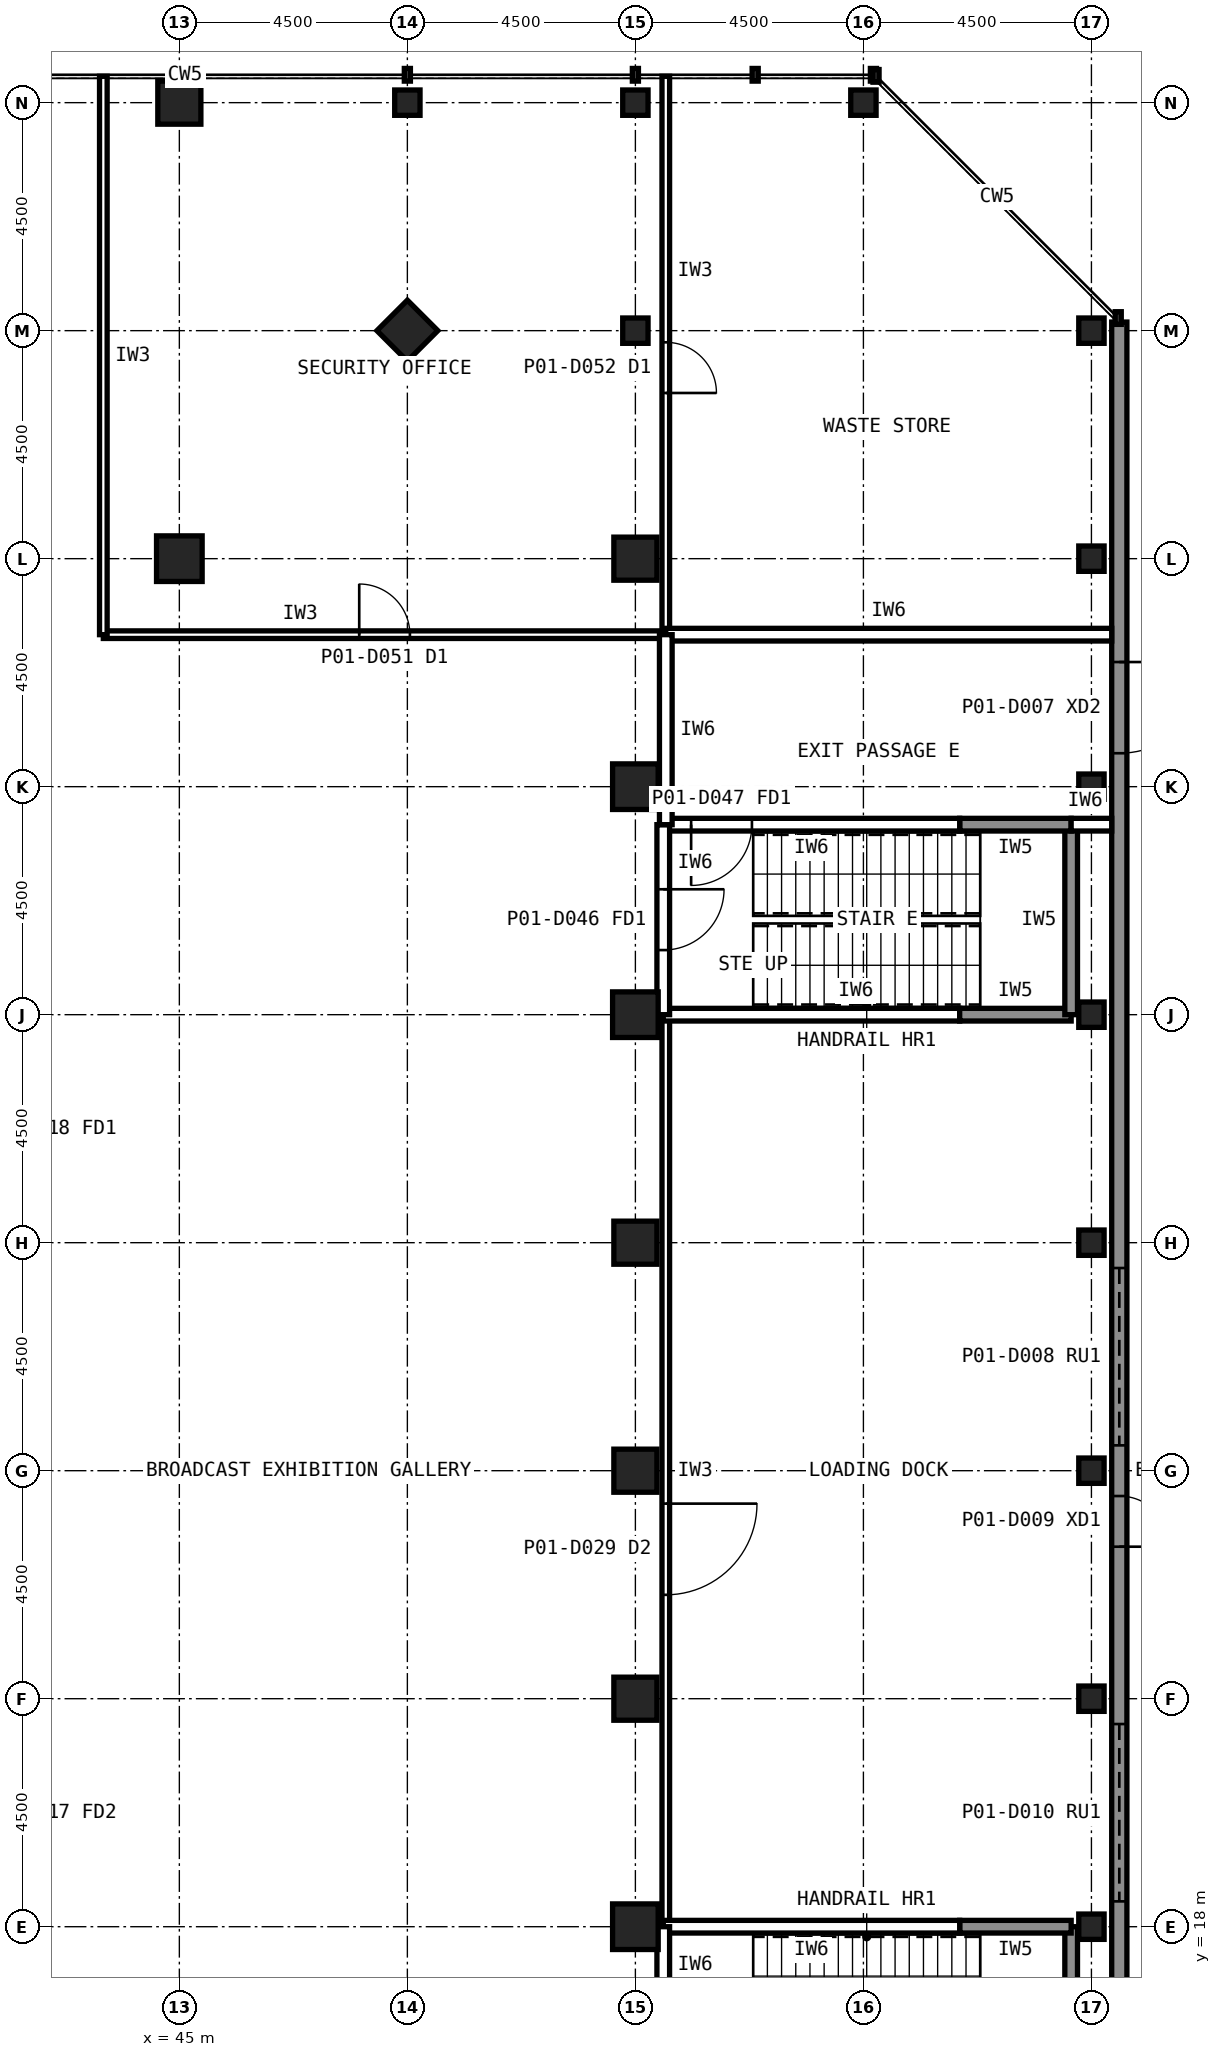
"""IFC4 building model, lengths in metres.
Left out: names, types, materials, properties, quantities, classifications, styles, units other than length and angle.
Written with IfcOpenShell. Run it as: python <this file> out.ifc"""

import sys

from ifc_helpers import new_model, si_unit, direction, frame, frame_2d, origin, origin_2d, place, context, subcontext, project, spatial, rectangle, hollow_rectangle, extrude, element, fill, save


model = new_model("IFC4")
c1 = context("Model", 3, precision=1e-05, world=origin(), true_north=direction((0.0, 1.0)))
c2 = subcontext(c1, "Body", "Model", "MODEL_VIEW")
j1 = project(units=[si_unit("LENGTHUNIT", "METRE"), si_unit("PLANEANGLEUNIT", "RADIAN")], contexts=[c1])
p1 = place(None, origin())
s1 = spatial("IfcSite", under=j1, at=p1, CompositionType="ELEMENT")
p2 = place(p1, origin())
s2 = spatial("IfcBuilding", under=s1, at=p2, CompositionType="ELEMENT")
p3 = place(p2, origin())
s3 = spatial("IfcBuildingStorey", under=s2, at=p3, CompositionType="ELEMENT", Elevation=0.0)
p4 = place(p3, frame((54.0, 18.0, -0.25), z_axis=(0.0, 0.0, 1.0), x_axis=(1.0, 0.0, 0.0)))
e1 = element("IfcColumn", 1, at=p4, inside=s3, PredefinedType="COLUMN", context=c2, shape_type="SweptSolid", body=[
    extrude(hollow_rectangle(XDim=0.9, YDim=0.9, WallThickness=0.063, at=origin_2d()), origin(), (0.0, 0.0, 1.0), 6.25),
])
for number, where, z_axis, x_axis in (
    (2, (54.0, 22.5, -0.25), (0.0, 0.0, 1.0), (1.0, 0.0, 0.0)),
    (3, (54.0, 27.0, -0.25), (0.0, 0.0, 1.0), (1.0, 0.0, 0.0)),
    (4, (54.0, 31.5, -0.25), (0.0, 0.0, 1.0), (1.0, 0.0, 0.0)),
):
    element("IfcColumn", number, at=place(p3, frame(where, z_axis=z_axis, x_axis=x_axis)), inside=s3, PredefinedType="COLUMN", context=c2, shape_type="SweptSolid", body=[
        extrude(hollow_rectangle(XDim=0.85, YDim=0.85, WallThickness=0.05, at=origin_2d()), origin(), (0.0, 0.0, 1.0), 6.25),
    ])
for number, where, z_axis, x_axis in (
    (5, (54.0, 36.0, -0.25), (0.0, 0.0, 1.0), (1.0, 0.0, 0.0)),
    (6, (54.0, 40.5, -0.25), (0.0, 0.0, 1.0), (1.0, 0.0, 0.0)),
):
    element("IfcColumn", number, at=place(p3, frame(where, z_axis=z_axis, x_axis=x_axis)), inside=s3, PredefinedType="COLUMN", context=c2, shape_type="SweptSolid", body=[
        extrude(hollow_rectangle(XDim=0.9, YDim=0.9, WallThickness=0.063, at=origin_2d()), origin(), (0.0, 0.0, 1.0), 6.25),
    ])
for number, where, z_axis, x_axis in (
    (7, (54.0, 45.0, -0.25), (0.0, 0.0, 1.0), (1.0, 0.0, 0.0)),
    (8, (45.0, 54.0, -0.25), (0.0, 0.0, 1.0), (1.0, 0.0, 0.0)),
    (9, (49.5, 49.5, -0.25), (0.0, 0.0, 1.0), (0.707, 0.707, 0.0)),
):
    element("IfcColumn", number, at=place(p3, frame(where, z_axis=z_axis, x_axis=x_axis)), inside=s3, PredefinedType="COLUMN", context=c2, shape_type="SweptSolid", body=[
        extrude(hollow_rectangle(XDim=0.85, YDim=0.85, WallThickness=0.05, at=origin_2d()), origin(), (0.0, 0.0, 1.0), 6.25),
    ])
p5 = place(p3, frame((45.0, 45.0, -0.25), z_axis=(0.0, 0.0, 1.0), x_axis=(1.0, 0.0, 0.0)))
e10 = element("IfcColumn", 10, at=p5, inside=s3, PredefinedType="COLUMN", context=c2, shape_type="SweptSolid", body=[
    extrude(hollow_rectangle(XDim=0.9, YDim=0.9, WallThickness=0.063, at=origin_2d()), origin(), (0.0, 0.0, 1.0), 6.25),
])
for number, where, z_axis, x_axis in (
    (11, (63.0, 18.0, -0.25), (0.0, 0.0, 1.0), (1.0, 0.0, 0.0)),
    (12, (63.0, 22.5, -0.25), (0.0, 0.0, 1.0), (1.0, 0.0, 0.0)),
    (13, (63.0, 27.0, -0.25), (0.0, 0.0, 1.0), (1.0, 0.0, 0.0)),
    (14, (63.0, 31.5, -0.25), (0.0, 0.0, 1.0), (1.0, 0.0, 0.0)),
    (15, (63.0, 36.0, -0.25), (0.0, 0.0, 1.0), (1.0, 0.0, 0.0)),
    (16, (63.0, 40.5, -0.25), (0.0, 0.0, 1.0), (1.0, 0.0, 0.0)),
    (17, (63.0, 45.0, -0.25), (0.0, 0.0, 1.0), (1.0, 0.0, 0.0)),
    (18, (63.0, 49.5, -0.25), (0.0, 0.0, 1.0), (1.0, 0.0, 0.0)),
    (19, (58.5, 54.0, -0.25), (0.0, 0.0, 1.0), (1.0, 0.0, 0.0)),
    (20, (54.0, 54.0, -0.25), (0.0, 0.0, 1.0), (1.0, 0.0, 0.0)),
    (21, (49.5, 54.0, -0.25), (0.0, 0.0, 1.0), (1.0, 0.0, 0.0)),
    (22, (54.0, 49.5, -0.25), (0.0, 0.0, 1.0), (1.0, 0.0, 0.0)),
):
    element("IfcColumn", number, at=place(p3, frame(where, z_axis=z_axis, x_axis=x_axis)), inside=s3, PredefinedType="COLUMN", context=c2, shape_type="SweptSolid", body=[
        extrude(hollow_rectangle(XDim=0.5, YDim=0.5, WallThickness=0.022, at=origin_2d()), origin(), (0.0, 0.0, 1.0), 6.25),
    ])
p6 = place(p3, frame((63.55, 49.67, 0.0), z_axis=(0.0, 0.0, 1.0), x_axis=(0.0, -1.0, 0.0)))
e23 = element("IfcWall", 23, at=p6, inside=s3, PredefinedType="SOLIDWALL", context=c2, shape_type="SweptSolid", body=[
    extrude(rectangle(XDim=45.34, YDim=0.3, at=frame_2d((22.67, 0.0))), origin(), (0.0, 0.0, 1.0), 6.0),
])
p7 = place(p6, frame((27.67, 0.0, 0.0)))
e24 = element("IfcOpeningElement", 24, at=p7, cuts=e23, PredefinedType="OPENING", context=c2, shape_type="SweptSolid", body=[
    extrude(rectangle(XDim=3.5, YDim=4.5, at=frame_2d((1.75, 2.25))), frame((0.0, 0.16, 0.0), z_axis=(0.0, -1.0, 0.0), x_axis=(1.0, 0.0, 0.0)), (0.0, 0.0, 1.0), 0.32),
])
p8 = place(p6, frame((18.67, 0.0, 0.0)))
e25 = element("IfcOpeningElement", 25, at=p8, cuts=e23, PredefinedType="OPENING", context=c2, shape_type="SweptSolid", body=[
    extrude(rectangle(XDim=3.5, YDim=4.5, at=frame_2d((1.75, 2.25))), frame((0.0, 0.16, 0.0), z_axis=(0.0, -1.0, 0.0), x_axis=(1.0, 0.0, 0.0)), (0.0, 0.0, 1.0), 0.32),
])
p9 = place(p6, frame((23.17, 0.0, 0.0)))
e26 = element("IfcOpeningElement", 26, at=p9, cuts=e23, PredefinedType="OPENING", context=c2, shape_type="SweptSolid", body=[
    extrude(rectangle(XDim=1.0, YDim=2.1, at=frame_2d((0.5, 1.05))), frame((0.0, 0.16, 0.0), z_axis=(0.0, -1.0, 0.0), x_axis=(1.0, 0.0, 0.0)), (0.0, 0.0, 1.0), 0.32),
])
p10 = place(p6, frame((36.83, 0.0, 0.0)))
e27 = element("IfcOpeningElement", 27, at=p10, cuts=e23, PredefinedType="OPENING", context=c2, shape_type="SweptSolid", body=[
    extrude(rectangle(XDim=1.8, YDim=2.1, at=frame_2d((0.9, 1.05))), frame((0.0, 0.16, 0.0), z_axis=(0.0, -1.0, 0.0), x_axis=(1.0, 0.0, 0.0)), (0.0, 0.0, 1.0), 0.32),
])
p11 = place(p6, frame((6.71, 0.0, 0.0)))
e28 = element("IfcOpeningElement", 28, at=p11, cuts=e23, PredefinedType="OPENING", context=c2, shape_type="SweptSolid", body=[
    extrude(rectangle(XDim=1.8, YDim=2.1, at=frame_2d((0.9, 1.05))), frame((0.0, 0.16, 0.0), z_axis=(0.0, -1.0, 0.0), x_axis=(1.0, 0.0, 0.0)), (0.0, 0.0, 1.0), 0.32),
])
p12 = place(p3, frame((54.6, 35.95, 0.0), z_axis=(0.0, 0.0, 1.0), x_axis=(0.0, -1.0, 0.0)))
e29 = element("IfcWall", 29, at=p12, inside=s3, PredefinedType="PARTITIONING", context=c2, shape_type="SweptSolid", body=[
    extrude(rectangle(XDim=17.9, YDim=0.15, at=frame_2d((8.95, 0.0))), origin(), (0.0, 0.0, 1.0), 5.8),
])
p13 = place(p12, frame((9.6, 0.0, 0.0)))
e30 = element("IfcOpeningElement", 30, at=p13, cuts=e29, PredefinedType="OPENING", context=c2, shape_type="SweptSolid", body=[
    extrude(rectangle(XDim=1.8, YDim=2.4, at=frame_2d((0.9, 1.2))), frame((0.0, 0.085, 0.0), z_axis=(0.0, -1.0, 0.0), x_axis=(1.0, 0.0, 0.0)), (0.0, 0.0, 1.0), 0.17),
])
p14 = place(p3, frame((54.6, 54.52, 0.0), z_axis=(0.0, 0.0, 1.0), x_axis=(0.0, -1.0, 0.0)))
e31 = element("IfcWall", 31, at=p14, inside=s3, PredefinedType="PARTITIONING", context=c2, shape_type="SweptSolid", body=[
    extrude(rectangle(XDim=10.97, YDim=0.15, at=frame_2d((5.485, 0.0))), origin(), (0.0, 0.0, 1.0), 5.8),
])
p15 = place(p14, frame((5.25, 0.0, 0.0)))
e32 = element("IfcOpeningElement", 32, at=p15, cuts=e31, PredefinedType="OPENING", context=c2, shape_type="SweptSolid", body=[
    extrude(rectangle(XDim=1.0, YDim=2.1, at=frame_2d((0.5, 1.05))), frame((0.0, 0.085, 0.0), z_axis=(0.0, -1.0, 0.0), x_axis=(1.0, 0.0, 0.0)), (0.0, 0.0, 1.0), 0.17),
])
p16 = place(p3, frame((43.5, 43.5, 0.0), z_axis=(0.0, 0.0, 1.0), x_axis=(1.0, 0.0, 0.0)))
e33 = element("IfcWall", 33, at=p16, inside=s3, PredefinedType="PARTITIONING", context=c2, shape_type="SweptSolid", body=[
    extrude(rectangle(XDim=11.1, YDim=0.15, at=frame_2d((5.55, 0.0))), origin(), (0.0, 0.0, 1.0), 5.8),
])
p17 = place(p16, frame((5.05, 0.0, 0.0)))
e34 = element("IfcOpeningElement", 34, at=p17, cuts=e33, PredefinedType="OPENING", context=c2, shape_type="SweptSolid", body=[
    extrude(rectangle(XDim=1.0, YDim=2.1, at=frame_2d((0.5, 1.05))), frame((0.0, 0.085, 0.0), z_axis=(0.0, -1.0, 0.0), x_axis=(1.0, 0.0, 0.0)), (0.0, 0.0, 1.0), 0.17),
])
p18 = place(p3, frame((43.5, 54.52, 0.0), z_axis=(0.0, 0.0, 1.0), x_axis=(0.0, -1.0, 0.0)))
e35 = element("IfcWall", 35, at=p18, inside=s3, PredefinedType="PARTITIONING", context=c2, shape_type="SweptSolid", body=[
    extrude(rectangle(XDim=11.02, YDim=0.15, at=frame_2d((5.51, 0.0))), origin(), (0.0, 0.0, 1.0), 5.8),
])
p19 = place(p3, frame((62.6, 14.25, -0.25), z_axis=(0.0, 0.0, 1.0), x_axis=(0.0, 1.0, 0.0)))
e36 = element("IfcWall", 36, at=p19, inside=s3, PredefinedType="SOLIDWALL", context=c2, shape_type="SweptSolid", body=[
    extrude(rectangle(XDim=3.75, YDim=0.25, at=frame_2d((1.875, 0.0))), origin(), (0.0, 0.0, 1.0), 6.25),
])
p20 = place(p3, frame((62.6, 18.0, -0.25), z_axis=(0.0, 0.0, 1.0), x_axis=(-1.0, 0.0, 0.0)))
e37 = element("IfcWall", 37, at=p20, inside=s3, PredefinedType="SOLIDWALL", context=c2, shape_type="SweptSolid", body=[
    extrude(rectangle(XDim=2.2, YDim=0.25, at=frame_2d((1.1, 0.0))), origin(), (0.0, 0.0, 1.0), 5.439),
])
p21 = place(p3, frame((60.4, 18.0, -0.25), z_axis=(0.0, 0.0, 1.0), x_axis=(-1.0, 0.0, 0.0)))
e38 = element("IfcWall", 38, at=p21, inside=s3, PredefinedType="PARTITIONING", context=c2, shape_type="SweptSolid", body=[
    extrude(rectangle(XDim=5.85, YDim=0.25, at=frame_2d((2.925, 0.0))), origin(), (0.0, 0.0, 1.0), 5.439),
])
p22 = place(p3, frame((54.55, 18.0, -0.25), z_axis=(0.0, 0.0, 1.0), x_axis=(0.0, -1.0, 0.0)))
e39 = element("IfcWall", 39, at=p22, inside=s3, PredefinedType="PARTITIONING", context=c2, shape_type="SweptSolid", body=[
    extrude(rectangle(XDim=3.75, YDim=0.25, at=frame_2d((1.875, 0.0))), origin(), (0.0, 0.0, 1.0), 6.05),
])
p23 = place(p22, frame((1.275, 0.0, 0.25)))
e40 = element("IfcOpeningElement", 40, at=p23, cuts=e39, PredefinedType="OPENING", context=c2, shape_type="SweptSolid", body=[
    extrude(rectangle(XDim=1.2, YDim=2.1, at=frame_2d((0.6, 1.05))), frame((0.0, 0.135, 0.0), z_axis=(0.0, -1.0, 0.0), x_axis=(1.0, 0.0, 0.0)), (0.0, 0.0, 1.0), 0.27),
])
p24 = place(p3, frame((54.55, 36.0, -0.25), z_axis=(0.0, 0.0, 1.0), x_axis=(1.0, 0.0, 0.0)))
e41 = element("IfcWall", 41, at=p24, inside=s3, PredefinedType="PARTITIONING", context=c2, shape_type="SweptSolid", body=[
    extrude(rectangle(XDim=5.85, YDim=0.25, at=frame_2d((2.925, 0.0))), origin(), (0.0, 0.0, 1.0), 5.439),
])
p25 = place(p3, frame((60.4, 36.0, -0.25), z_axis=(0.0, 0.0, 1.0), x_axis=(1.0, 0.0, 0.0)))
e42 = element("IfcWall", 42, at=p25, inside=s3, PredefinedType="SOLIDWALL", context=c2, shape_type="SweptSolid", body=[
    extrude(rectangle(XDim=2.2, YDim=0.25, at=frame_2d((1.1, 0.0))), origin(), (0.0, 0.0, 1.0), 5.439),
])
p26 = place(p3, frame((62.6, 36.0, -0.25), z_axis=(0.0, 0.0, 1.0), x_axis=(0.0, 1.0, 0.0)))
e43 = element("IfcWall", 43, at=p26, inside=s3, PredefinedType="SOLIDWALL", context=c2, shape_type="SweptSolid", body=[
    extrude(rectangle(XDim=3.75, YDim=0.25, at=frame_2d((1.875, 0.0))), origin(), (0.0, 0.0, 1.0), 6.25),
])
p27 = place(p3, frame((62.6, 39.75, -0.25), z_axis=(0.0, 0.0, 1.0), x_axis=(-1.0, 0.0, 0.0)))
e44 = element("IfcWall", 44, at=p27, inside=s3, PredefinedType="SOLIDWALL", context=c2, shape_type="SweptSolid", body=[
    extrude(rectangle(XDim=2.2, YDim=0.25, at=frame_2d((1.1, 0.0))), origin(), (0.0, 0.0, 1.0), 6.25),
])
p28 = place(p3, frame((60.4, 39.75, -0.25), z_axis=(0.0, 0.0, 1.0), x_axis=(-1.0, 0.0, 0.0)))
e45 = element("IfcWall", 45, at=p28, inside=s3, PredefinedType="PARTITIONING", context=c2, shape_type="SweptSolid", body=[
    extrude(rectangle(XDim=5.85, YDim=0.25, at=frame_2d((2.925, 0.0))), origin(), (0.0, 0.0, 1.0), 6.05),
])
p29 = place(p28, frame((4.1, 0.0, 0.25)))
e46 = element("IfcOpeningElement", 46, at=p29, cuts=e45, PredefinedType="OPENING", context=c2, shape_type="SweptSolid", body=[
    extrude(rectangle(XDim=1.2, YDim=2.1, at=frame_2d((0.6, 1.05))), frame((0.0, 0.135, 0.0), z_axis=(0.0, -1.0, 0.0), x_axis=(1.0, 0.0, 0.0)), (0.0, 0.0, 1.0), 0.27),
])
p30 = place(p3, frame((54.55, 39.75, -0.25), z_axis=(0.0, 0.0, 1.0), x_axis=(0.0, -1.0, 0.0)))
e47 = element("IfcWall", 47, at=p30, inside=s3, PredefinedType="PARTITIONING", context=c2, shape_type="SweptSolid", body=[
    extrude(rectangle(XDim=3.75, YDim=0.25, at=frame_2d((1.875, 0.0))), origin(), (0.0, 0.0, 1.0), 6.05),
])
p31 = place(p30, frame((1.275, 0.0, 0.25)))
e48 = element("IfcOpeningElement", 48, at=p31, cuts=e47, PredefinedType="OPENING", context=c2, shape_type="SweptSolid", body=[
    extrude(rectangle(XDim=1.2, YDim=2.1, at=frame_2d((0.6, 1.05))), frame((0.0, 0.135, 0.0), z_axis=(0.0, -1.0, 0.0), x_axis=(1.0, 0.0, 0.0)), (0.0, 0.0, 1.0), 0.27),
])
p32 = place(p3, frame((54.6, 43.5, 0.0), z_axis=(0.0, 0.0, 1.0), x_axis=(1.0, 0.0, 0.0)))
e49 = element("IfcWall", 49, at=p32, inside=s3, PredefinedType="PARTITIONING", context=c2, shape_type="SweptSolid", body=[
    extrude(rectangle(XDim=8.8, YDim=0.25, at=frame_2d((4.4, 0.0))), origin(), (0.0, 0.0, 1.0), 5.8),
])
p33 = place(p3, frame((54.6, 43.5, 0.0), z_axis=(0.0, 0.0, 1.0), x_axis=(0.0, -1.0, 0.0)))
e50 = element("IfcWall", 50, at=p33, inside=s3, PredefinedType="PARTITIONING", context=c2, shape_type="SweptSolid", body=[
    extrude(rectangle(XDim=3.75, YDim=0.25, at=frame_2d((1.875, 0.0))), origin(), (0.0, 0.0, 1.0), 5.8),
])
p34 = place(p3, frame((62.6, 39.75, 0.0), z_axis=(0.0, 0.0, 1.0), x_axis=(1.0, 0.0, 0.0)))
e51 = element("IfcWall", 51, at=p34, inside=s3, PredefinedType="PARTITIONING", context=c2, shape_type="SweptSolid", body=[
    extrude(rectangle(XDim=0.8, YDim=0.25, at=frame_2d((0.4, 0.0))), origin(), (0.0, 0.0, 1.0), 5.8),
])
p35 = place(p7, origin())
e52 = element("IfcDoor", 52, at=p35, inside=s3, OperationType="SINGLE_SWING_LEFT", PredefinedType="DOOR", context=c2, shape_type="SweptSolid", body=[
    extrude(rectangle(XDim=3.5, YDim=4.5, at=frame_2d((1.75, 2.25))), frame((0.0, 0.025, 0.0), z_axis=(0.0, -1.0, 0.0), x_axis=(1.0, 0.0, 0.0)), (0.0, 0.0, 1.0), 0.05),
])
fill(e24, e52)
p36 = place(p8, origin())
e53 = element("IfcDoor", 53, at=p36, inside=s3, OperationType="SINGLE_SWING_LEFT", PredefinedType="DOOR", context=c2, shape_type="SweptSolid", body=[
    extrude(rectangle(XDim=3.5, YDim=4.5, at=frame_2d((1.75, 2.25))), frame((0.0, 0.025, 0.0), z_axis=(0.0, -1.0, 0.0), x_axis=(1.0, 0.0, 0.0)), (0.0, 0.0, 1.0), 0.05),
])
fill(e25, e53)
p37 = place(p9, origin())
e54 = element("IfcDoor", 54, at=p37, inside=s3, OperationType="SINGLE_SWING_RIGHT", PredefinedType="DOOR", context=c2, shape_type="SweptSolid", body=[
    extrude(rectangle(XDim=1.0, YDim=2.1, at=frame_2d((0.5, 1.05))), frame((0.0, 0.025, 0.0), z_axis=(0.0, -1.0, 0.0), x_axis=(1.0, 0.0, 0.0)), (0.0, 0.0, 1.0), 0.05),
])
fill(e26, e54)
p38 = place(p11, origin())
e55 = element("IfcDoor", 55, at=p38, inside=s3, OperationType="SINGLE_SWING_LEFT", PredefinedType="DOOR", context=c2, shape_type="SweptSolid", body=[
    extrude(rectangle(XDim=1.8, YDim=2.1, at=frame_2d((0.9, 1.05))), frame((0.0, 0.025, 0.0), z_axis=(0.0, -1.0, 0.0), x_axis=(1.0, 0.0, 0.0)), (0.0, 0.0, 1.0), 0.05),
])
fill(e28, e55)
p39 = place(p13, origin())
e56 = element("IfcDoor", 56, at=p39, inside=s3, OperationType="SINGLE_SWING_LEFT", PredefinedType="DOOR", context=c2, shape_type="SweptSolid", body=[
    extrude(rectangle(XDim=1.8, YDim=2.4, at=frame_2d((0.9, 1.2))), frame((0.0, 0.025, 0.0), z_axis=(0.0, -1.0, 0.0), x_axis=(1.0, 0.0, 0.0)), (0.0, 0.0, 1.0), 0.05),
])
fill(e30, e56)
p40 = place(p15, origin())
e57 = element("IfcDoor", 57, at=p40, inside=s3, OperationType="SINGLE_SWING_RIGHT", PredefinedType="DOOR", context=c2, shape_type="SweptSolid", body=[
    extrude(rectangle(XDim=1.0, YDim=2.1, at=frame_2d((0.5, 1.05))), frame((0.0, 0.025, 0.0), z_axis=(0.0, -1.0, 0.0), x_axis=(1.0, 0.0, 0.0)), (0.0, 0.0, 1.0), 0.05),
])
fill(e32, e57)
p41 = place(p17, origin())
e58 = element("IfcDoor", 58, at=p41, inside=s3, OperationType="SINGLE_SWING_LEFT", PredefinedType="DOOR", context=c2, shape_type="SweptSolid", body=[
    extrude(rectangle(XDim=1.0, YDim=2.1, at=frame_2d((0.5, 1.05))), frame((0.0, 0.025, 0.0), z_axis=(0.0, -1.0, 0.0), x_axis=(1.0, 0.0, 0.0)), (0.0, 0.0, 1.0), 0.05),
])
fill(e34, e58)
p42 = place(p31, origin())
e59 = element("IfcDoor", 59, at=p42, inside=s3, OperationType="SINGLE_SWING_LEFT", PredefinedType="DOOR", context=c2, shape_type="SweptSolid", body=[
    extrude(rectangle(XDim=1.2, YDim=2.1, at=frame_2d((0.6, 1.05))), frame((0.0, 0.025, 0.0), z_axis=(0.0, -1.0, 0.0), x_axis=(1.0, 0.0, 0.0)), (0.0, 0.0, 1.0), 0.05),
])
fill(e48, e59)
p43 = place(p29, origin())
e60 = element("IfcDoor", 60, at=p43, inside=s3, OperationType="SINGLE_SWING_RIGHT", PredefinedType="DOOR", context=c2, shape_type="SweptSolid", body=[
    extrude(rectangle(XDim=1.2, YDim=2.1, at=frame_2d((0.6, 1.05))), frame((0.0, 0.025, 0.0), z_axis=(0.0, -1.0, 0.0), x_axis=(1.0, 0.0, 0.0)), (0.0, 0.0, 1.0), 0.05),
])
fill(e46, e60)
save(model, sys.argv[1])
